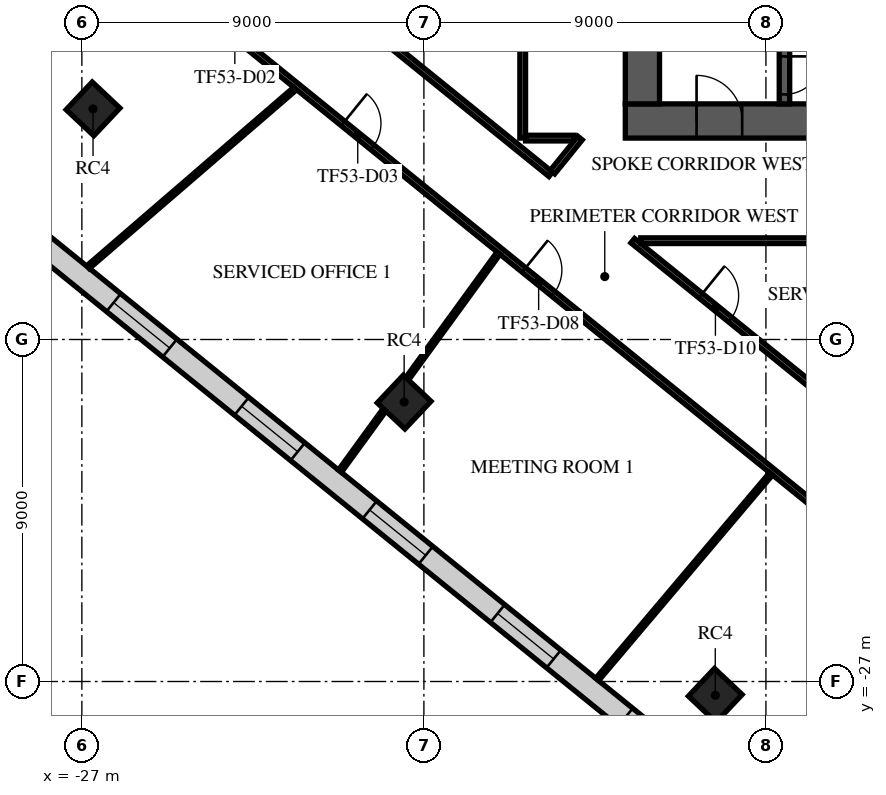
"""IFC4 building model, lengths in metres.
Left out: names, types, materials, properties, quantities, classifications, styles, units other than length and angle.
Written with IfcOpenShell. Run it as: python <this file> out.ifc"""

import sys

from ifc_helpers import new_model, si_unit, direction, frame, frame_2d, origin, origin_2d, place, context, subcontext, project, spatial, rectangle, extrude, element, fill, save


model = new_model("IFC4")
c1 = context("Model", 3, precision=1e-05, world=origin(), true_north=direction((0.0, 1.0)))
c2 = subcontext(c1, "Body", "Model", "MODEL_VIEW")
j1 = project(units=[si_unit("LENGTHUNIT", "METRE"), si_unit("PLANEANGLEUNIT", "RADIAN")], contexts=[c1])
p1 = place(None, origin())
s1 = spatial("IfcSite", under=j1, at=p1, CompositionType="ELEMENT")
p2 = place(p1, origin())
s2 = spatial("IfcBuilding", under=s1, at=p2, CompositionType="ELEMENT")
p3 = place(p2, frame((0.0, 0.0, 225.3)))
s3 = spatial("IfcBuildingStorey", under=s2, at=p3, CompositionType="ELEMENT", Elevation=225.3)
for number, where, z_axis, x_axis in (
    (1, (-26.706, -11.931, 0.0), (0.0, 0.0, 1.0), (0.686, 0.728, 0.0)),
    (2, (-18.52, -19.647, 0.0), (0.0, 0.0, 1.0), (0.686, 0.728, 0.0)),
    (3, (-10.333, -27.364, 0.0), (0.0, 0.0, 1.0), (0.686, 0.728, 0.0)),
):
    element("IfcColumn", number, at=place(p3, frame(where, z_axis=z_axis, x_axis=x_axis)), inside=s3, PredefinedType="COLUMN", context=c2, shape_type="SweptSolid", body=[
        extrude(rectangle(XDim=1.0, YDim=1.0, at=origin_2d()), origin(), (0.0, 0.0, 1.0), 4.0),
    ])
p4 = place(p3, frame((-12.7, -12.25, 0.0), z_axis=(0.0, 0.0, 1.0), x_axis=(1.0, 0.0, 0.0)))
e4 = element("IfcWall", 4, at=p4, inside=s3, PredefinedType="SHEAR", context=c2, shape_type="SweptSolid", body=[
    extrude(rectangle(XDim=25.4, YDim=0.9, at=frame_2d((12.7, 0.0))), origin(), (0.0, 0.0, 1.0), 3.62),
])
p5 = place(p4, frame((7.6, 0.0, 0.0)))
e5 = element("IfcOpeningElement", 5, at=p5, cuts=e4, PredefinedType="OPENING", context=c2, shape_type="SweptSolid", body=[
    extrude(rectangle(XDim=2.0, YDim=2.1, at=frame_2d((1.0, 1.05))), frame((0.0, 0.46, 0.0), z_axis=(0.0, -1.0, 0.0), x_axis=(1.0, 0.0, 0.0)), (0.0, 0.0, 1.0), 0.92),
])
p6 = place(p4, frame((17.725, 0.0, 0.0)))
e6 = element("IfcOpeningElement", 6, at=p6, cuts=e4, PredefinedType="OPENING", context=c2, shape_type="SweptSolid", body=[
    extrude(rectangle(XDim=1.2, YDim=2.1, at=frame_2d((0.6, 1.05))), frame((0.0, 0.46, 0.0), z_axis=(0.0, -1.0, 0.0), x_axis=(1.0, 0.0, 0.0)), (0.0, 0.0, 1.0), 0.92),
])
p7 = place(p4, frame((1.875, 0.0, 0.0)))
e7 = element("IfcOpeningElement", 7, at=p7, cuts=e4, PredefinedType="OPENING", context=c2, shape_type="SweptSolid", body=[
    extrude(rectangle(XDim=1.2, YDim=2.1, at=frame_2d((0.6, 1.05))), frame((0.0, 0.46, 0.0), z_axis=(0.0, -1.0, 0.0), x_axis=(1.0, 0.0, 0.0)), (0.0, 0.0, 1.0), 0.92),
])
p8 = place(p4, frame((22.325, 0.0, 0.0)))
e8 = element("IfcOpeningElement", 8, at=p8, cuts=e4, PredefinedType="OPENING", context=c2, shape_type="SweptSolid", body=[
    extrude(rectangle(XDim=1.2, YDim=2.1, at=frame_2d((0.6, 1.05))), frame((0.0, 0.46, 0.0), z_axis=(0.0, -1.0, 0.0), x_axis=(1.0, 0.0, 0.0)), (0.0, 0.0, 1.0), 0.92),
])
p9 = place(p3, frame((-12.25, -11.8, 0.0), z_axis=(0.0, 0.0, 1.0), x_axis=(0.0, 1.0, 0.0)))
e9 = element("IfcWall", 9, at=p9, inside=s3, PredefinedType="SHEAR", context=c2, shape_type="SweptSolid", body=[
    extrude(rectangle(XDim=23.6, YDim=0.9, at=frame_2d((11.8, 0.0))), origin(), (0.0, 0.0, 1.0), 3.62),
])
p10 = place(p9, frame((10.6, 0.0, 0.0)))
e10 = element("IfcOpeningElement", 10, at=p10, cuts=e9, PredefinedType="OPENING", context=c2, shape_type="SweptSolid", body=[
    extrude(rectangle(XDim=2.4, YDim=2.4, at=frame_2d((1.2, 1.2))), frame((0.0, 0.46, 0.0), z_axis=(0.0, -1.0, 0.0), x_axis=(1.0, 0.0, 0.0)), (0.0, 0.0, 1.0), 0.92),
])
p11 = place(p3, frame((-8.512, -4.55, 0.0), z_axis=(0.0, 0.0, 1.0), x_axis=(0.0, -1.0, 0.0)))
e11 = element("IfcWall", 11, at=p11, inside=s3, PredefinedType="SOLIDWALL", context=c2, shape_type="SweptSolid", body=[
    extrude(rectangle(XDim=7.25, YDim=0.275, at=frame_2d((3.625, 0.0))), origin(), (0.0, 0.0, 1.0), 3.62),
])
p12 = place(p11, frame((6.0, 0.0, 0.0)))
e12 = element("IfcOpeningElement", 12, at=p12, cuts=e11, PredefinedType="OPENING", context=c2, shape_type="SweptSolid", body=[
    extrude(rectangle(XDim=1.0, YDim=2.1, at=frame_2d((0.5, 1.05))), frame((0.0, 0.147, 0.0), z_axis=(0.0, -1.0, 0.0), x_axis=(1.0, 0.0, 0.0)), (0.0, 0.0, 1.0), 0.295),
])
p13 = place(p3, frame((-33.845, -10.81, 0.0), z_axis=(0.0, 0.0, 1.0), x_axis=(0.777145437972, -0.629321037499, 0.0)))
e13 = element("IfcWall", 13, at=p13, inside=s3, PredefinedType="STANDARD", context=c2, shape_type="SweptSolid", body=[
    extrude(rectangle(XDim=39.0, YDim=0.6, at=frame_2d((19.5, 0.0))), origin(), (0.0, 0.0, 1.0), 3.62),
])
p14 = place(p13, frame((1.217, 0.0, 0.9)))
e14 = element("IfcOpeningElement", 14, at=p14, cuts=e13, PredefinedType="OPENING", context=c2, shape_type="SweptSolid", body=[
    extrude(rectangle(XDim=1.9, YDim=2.1, at=frame_2d((0.95, 1.05))), frame((0.0, 0.31, 0.0), z_axis=(0.0, -1.0, 0.0), x_axis=(1.0, 0.0, 0.0)), (0.0, 0.0, 1.0), 0.62),
])
p15 = place(p13, frame((5.55, 0.0, 0.9)))
e15 = element("IfcOpeningElement", 15, at=p15, cuts=e13, PredefinedType="OPENING", context=c2, shape_type="SweptSolid", body=[
    extrude(rectangle(XDim=1.9, YDim=2.1, at=frame_2d((0.95, 1.05))), frame((0.0, 0.31, 0.0), z_axis=(0.0, -1.0, 0.0), x_axis=(1.0, 0.0, 0.0)), (0.0, 0.0, 1.0), 0.62),
])
p16 = place(p13, frame((9.883, 0.0, 0.9)))
e16 = element("IfcOpeningElement", 16, at=p16, cuts=e13, PredefinedType="OPENING", context=c2, shape_type="SweptSolid", body=[
    extrude(rectangle(XDim=1.9, YDim=2.1, at=frame_2d((0.95, 1.05))), frame((0.0, 0.31, 0.0), z_axis=(0.0, -1.0, 0.0), x_axis=(1.0, 0.0, 0.0)), (0.0, 0.0, 1.0), 0.62),
])
p17 = place(p13, frame((14.217, 0.0, 0.9)))
e17 = element("IfcOpeningElement", 17, at=p17, cuts=e13, PredefinedType="OPENING", context=c2, shape_type="SweptSolid", body=[
    extrude(rectangle(XDim=1.9, YDim=2.1, at=frame_2d((0.95, 1.05))), frame((0.0, 0.31, 0.0), z_axis=(0.0, -1.0, 0.0), x_axis=(1.0, 0.0, 0.0)), (0.0, 0.0, 1.0), 0.62),
])
p18 = place(p13, frame((18.55, 0.0, 0.9)))
e18 = element("IfcOpeningElement", 18, at=p18, cuts=e13, PredefinedType="OPENING", context=c2, shape_type="SweptSolid", body=[
    extrude(rectangle(XDim=1.9, YDim=2.1, at=frame_2d((0.95, 1.05))), frame((0.0, 0.31, 0.0), z_axis=(0.0, -1.0, 0.0), x_axis=(1.0, 0.0, 0.0)), (0.0, 0.0, 1.0), 0.62),
])
p19 = place(p13, frame((22.883, 0.0, 0.9)))
e19 = element("IfcOpeningElement", 19, at=p19, cuts=e13, PredefinedType="OPENING", context=c2, shape_type="SweptSolid", body=[
    extrude(rectangle(XDim=1.9, YDim=2.1, at=frame_2d((0.95, 1.05))), frame((0.0, 0.31, 0.0), z_axis=(0.0, -1.0, 0.0), x_axis=(1.0, 0.0, 0.0)), (0.0, 0.0, 1.0), 0.62),
])
p20 = place(p13, frame((27.217, 0.0, 0.9)))
e20 = element("IfcOpeningElement", 20, at=p20, cuts=e13, PredefinedType="OPENING", context=c2, shape_type="SweptSolid", body=[
    extrude(rectangle(XDim=1.9, YDim=2.1, at=frame_2d((0.95, 1.05))), frame((0.0, 0.31, 0.0), z_axis=(0.0, -1.0, 0.0), x_axis=(1.0, 0.0, 0.0)), (0.0, 0.0, 1.0), 0.62),
])
p21 = place(p13, frame((31.55, 0.0, 0.9)))
e21 = element("IfcOpeningElement", 21, at=p21, cuts=e13, PredefinedType="OPENING", context=c2, shape_type="SweptSolid", body=[
    extrude(rectangle(XDim=1.9, YDim=2.1, at=frame_2d((0.95, 1.05))), frame((0.0, 0.31, 0.0), z_axis=(0.0, -1.0, 0.0), x_axis=(1.0, 0.0, 0.0)), (0.0, 0.0, 1.0), 0.62),
])
p22 = place(p13, frame((35.883, 0.0, 0.9)))
e22 = element("IfcOpeningElement", 22, at=p22, cuts=e13, PredefinedType="OPENING", context=c2, shape_type="SweptSolid", body=[
    extrude(rectangle(XDim=1.9, YDim=2.1, at=frame_2d((0.95, 1.05))), frame((0.0, 0.31, 0.0), z_axis=(0.0, -1.0, 0.0), x_axis=(1.0, 0.0, 0.0)), (0.0, 0.0, 1.0), 0.62),
])
p23 = place(p3, frame((-24.374, -8.878, 0.0), z_axis=(0.0, 0.0, 1.0), x_axis=(0.777132572121, -0.629336925143, 0.0)))
e23 = element("IfcWall", 23, at=p23, inside=s3, PredefinedType="PARTITIONING", context=c2, shape_type="SweptSolid", body=[
    extrude(rectangle(XDim=26.785, YDim=0.15, at=frame_2d((13.393, 0.0))), origin(), (0.0, 0.0, 1.0), 3.17),
])
p24 = place(p23, frame((1.3, 0.0, 0.0)))
e24 = element("IfcOpeningElement", 24, at=p24, cuts=e23, PredefinedType="OPENING", context=c2, shape_type="SweptSolid", body=[
    extrude(rectangle(XDim=1.0, YDim=2.1, at=frame_2d((0.5, 1.05))), frame((0.0, 0.085, 0.0), z_axis=(0.0, -1.0, 0.0), x_axis=(1.0, 0.0, 0.0)), (0.0, 0.0, 1.0), 0.17),
])
p25 = place(p23, frame((5.461, 0.0, 0.0)))
e25 = element("IfcOpeningElement", 25, at=p25, cuts=e23, PredefinedType="OPENING", context=c2, shape_type="SweptSolid", body=[
    extrude(rectangle(XDim=1.0, YDim=2.1, at=frame_2d((0.5, 1.05))), frame((0.0, 0.085, 0.0), z_axis=(0.0, -1.0, 0.0), x_axis=(1.0, 0.0, 0.0)), (0.0, 0.0, 1.0), 0.17),
])
p26 = place(p23, frame((11.587, 0.0, 0.0)))
e26 = element("IfcOpeningElement", 26, at=p26, cuts=e23, PredefinedType="OPENING", context=c2, shape_type="SweptSolid", body=[
    extrude(rectangle(XDim=1.0, YDim=2.1, at=frame_2d((0.5, 1.05))), frame((0.0, 0.085, 0.0), z_axis=(0.0, -1.0, 0.0), x_axis=(1.0, 0.0, 0.0)), (0.0, 0.0, 1.0), 0.17),
])
p27 = place(p3, frame((-22.922, -6.965, 0.0), z_axis=(0.0, 0.0, 1.0), x_axis=(0.777148029431, -0.629317837306, 0.0)))
e27 = element("IfcWall", 27, at=p27, inside=s3, PredefinedType="PARTITIONING", context=c2, shape_type="SweptSolid", body=[
    extrude(rectangle(XDim=10.627, YDim=0.15, at=frame_2d((5.314, 0.0))), origin(), (0.0, 0.0, 1.0), 3.17),
])
p28 = place(p3, frame((-15.4, -12.7, 0.0), z_axis=(0.0, 0.0, 1.0), x_axis=(0.0, 1.0, 0.0)))
e28 = element("IfcWall", 28, at=p28, inside=s3, PredefinedType="PARTITIONING", context=c2, shape_type="SweptSolid", body=[
    extrude(rectangle(XDim=20.227, YDim=0.15, at=frame_2d((10.114, 0.0))), origin(), (0.0, 0.0, 1.0), 3.17),
])
p29 = place(p28, frame((10.4, 0.0, 0.0)))
e29 = element("IfcOpeningElement", 29, at=p29, cuts=e28, PredefinedType="OPENING", context=c2, shape_type="SweptSolid", body=[
    extrude(rectangle(XDim=1.0, YDim=2.1, at=frame_2d((0.5, 1.05))), frame((0.0, 0.085, 0.0), z_axis=(0.0, -1.0, 0.0), x_axis=(1.0, 0.0, 0.0)), (0.0, 0.0, 1.0), 0.17),
])
p30 = place(p28, frame((15.784, 0.0, 0.0)))
e30 = element("IfcOpeningElement", 30, at=p30, cuts=e28, PredefinedType="OPENING", context=c2, shape_type="SweptSolid", body=[
    extrude(rectangle(XDim=1.0, YDim=2.1, at=frame_2d((0.5, 1.05))), frame((0.0, 0.085, 0.0), z_axis=(0.0, -1.0, 0.0), x_axis=(1.0, 0.0, 0.0)), (0.0, 0.0, 1.0), 0.17),
])
p31 = place(p3, frame((-15.325, -12.7, 0.0), z_axis=(0.0, 0.0, 1.0), x_axis=(1.0, 0.0, 0.0)))
e31 = element("IfcWall", 31, at=p31, inside=s3, PredefinedType="PARTITIONING", context=c2, shape_type="SweptSolid", body=[
    extrude(rectangle(XDim=1.277, YDim=0.15, at=frame_2d((0.638, 0.0))), origin(), (0.0, 0.0, 1.0), 3.17),
])
p32 = place(p3, frame((-14.616, -13.595, 0.0), z_axis=(0.0, 0.0, 1.0), x_axis=(0.629338514223, 0.777131285251, 0.0)))
e32 = element("IfcWall", 32, at=p32, inside=s3, PredefinedType="PARTITIONING", context=c2, shape_type="SweptSolid", body=[
    extrude(rectangle(XDim=1.151, YDim=0.15, at=frame_2d((0.576, 0.0))), origin(), (0.0, 0.0, 1.0), 3.17),
])
p33 = place(p3, frame((-12.505, -15.4, 0.0), z_axis=(0.0, 0.0, 1.0), x_axis=(0.77712909422, -0.629341219783, 0.0)))
e33 = element("IfcWall", 33, at=p33, inside=s3, PredefinedType="PARTITIONING", context=c2, shape_type="SweptSolid", body=[
    extrude(rectangle(XDim=13.457, YDim=0.15, at=frame_2d((6.729, 0.0))), origin(), (0.0, 0.0, 1.0), 3.17),
])
p34 = place(p33, frame((2.3, 0.0, 0.0)))
e34 = element("IfcOpeningElement", 34, at=p34, cuts=e33, PredefinedType="OPENING", context=c2, shape_type="SweptSolid", body=[
    extrude(rectangle(XDim=1.0, YDim=2.1, at=frame_2d((0.5, 1.05))), frame((0.0, 0.085, 0.0), z_axis=(0.0, -1.0, 0.0), x_axis=(1.0, 0.0, 0.0)), (0.0, 0.0, 1.0), 0.17),
])
p35 = place(p3, frame((-12.293, -15.4, 0.0), z_axis=(0.0, 0.0, 1.0), x_axis=(1.0, 0.0, 0.0)))
e35 = element("IfcWall", 35, at=p35, inside=s3, PredefinedType="PARTITIONING", context=c2, shape_type="SweptSolid", body=[
    extrude(rectangle(XDim=21.489, YDim=0.15, at=frame_2d((10.745, 0.0))), origin(), (0.0, 0.0, 1.0), 3.17),
])
p36 = place(p35, frame((13.212, 0.0, 0.0)))
e36 = element("IfcOpeningElement", 36, at=p36, cuts=e35, PredefinedType="OPENING", context=c2, shape_type="SweptSolid", body=[
    extrude(rectangle(XDim=1.8, YDim=2.1, at=frame_2d((0.9, 1.05))), frame((0.0, 0.085, 0.0), z_axis=(0.0, -1.0, 0.0), x_axis=(1.0, 0.0, 0.0)), (0.0, 0.0, 1.0), 0.17),
])
p37 = place(p3, frame((-26.837, -16.096, 0.0), z_axis=(0.0, 0.0, 1.0), x_axis=(0.757242011922, 0.653134393046, 0.0)))
e37 = element("IfcWall", 37, at=p37, inside=s3, PredefinedType="PARTITIONING", context=c2, shape_type="SweptSolid", body=[
    extrude(rectangle(XDim=7.19, YDim=0.1, at=frame_2d((3.595, 0.0))), origin(), (0.0, 0.0, 1.0), 2.97),
])
p38 = place(p3, frame((-20.208, -21.464, 0.0), z_axis=(0.0, 0.0, 1.0), x_axis=(0.588273501318, 0.808662035492, 0.0)))
e38 = element("IfcWall", 38, at=p38, inside=s3, PredefinedType="PARTITIONING", context=c2, shape_type="SweptSolid", body=[
    extrude(rectangle(XDim=1.996, YDim=0.1, at=frame_2d((0.998, 0.0))), origin(), (0.0, 0.0, 1.0), 3.62),
])
p39 = place(p3, frame((-18.441, -19.034, 0.0), z_axis=(0.0, 0.0, 1.0), x_axis=(0.588267582256, 0.808666341371, 0.0)))
e39 = element("IfcWall", 39, at=p39, inside=s3, PredefinedType="PARTITIONING", context=c2, shape_type="SweptSolid", body=[
    extrude(rectangle(XDim=4.087, YDim=0.1, at=frame_2d((2.044, 0.0))), origin(), (0.0, 0.0, 1.0), 3.05),
])
p40 = place(p3, frame((-13.439, -26.945, 0.0), z_axis=(0.0, 0.0, 1.0), x_axis=(0.645645597662, 0.763637192795, 0.0)))
e40 = element("IfcWall", 40, at=p40, inside=s3, PredefinedType="PARTITIONING", context=c2, shape_type="SweptSolid", body=[
    extrude(rectangle(XDim=7.085, YDim=0.1, at=frame_2d((3.542, 0.0))), origin(), (0.0, 0.0, 1.0), 2.97),
])
p41 = place(p7, origin())
e41 = element("IfcDoor", 41, at=p41, inside=s3, OperationType="SINGLE_SWING_LEFT", PredefinedType="DOOR", context=c2, shape_type="SweptSolid", body=[
    extrude(rectangle(XDim=1.2, YDim=2.1, at=frame_2d((0.6, 1.05))), frame((0.0, 0.025, 0.0), z_axis=(0.0, -1.0, 0.0), x_axis=(1.0, 0.0, 0.0)), (0.0, 0.0, 1.0), 0.05),
])
fill(e7, e41)
p42 = place(p12, origin())
e42 = element("IfcDoor", 42, at=p42, inside=s3, OperationType="SINGLE_SWING_LEFT", PredefinedType="DOOR", context=c2, shape_type="SweptSolid", body=[
    extrude(rectangle(XDim=1.0, YDim=2.1, at=frame_2d((0.5, 1.05))), frame((0.0, 0.025, 0.0), z_axis=(0.0, -1.0, 0.0), x_axis=(1.0, 0.0, 0.0)), (0.0, 0.0, 1.0), 0.05),
])
fill(e12, e42)
p43 = place(p16, origin())
e43 = element("IfcWindow", 43, at=p43, inside=s3, PartitioningType="SINGLE_PANEL", PredefinedType="WINDOW", context=c2, shape_type="SweptSolid", body=[
    extrude(rectangle(XDim=1.9, YDim=2.1, at=frame_2d((0.95, 1.05))), frame((0.0, 0.03, 0.0), z_axis=(0.0, -1.0, 0.0), x_axis=(1.0, 0.0, 0.0)), (0.0, 0.0, 1.0), 0.06),
])
fill(e16, e43)
p44 = place(p17, origin())
e44 = element("IfcWindow", 44, at=p44, inside=s3, PartitioningType="SINGLE_PANEL", PredefinedType="WINDOW", context=c2, shape_type="SweptSolid", body=[
    extrude(rectangle(XDim=1.9, YDim=2.1, at=frame_2d((0.95, 1.05))), frame((0.0, 0.03, 0.0), z_axis=(0.0, -1.0, 0.0), x_axis=(1.0, 0.0, 0.0)), (0.0, 0.0, 1.0), 0.06),
])
fill(e17, e44)
p45 = place(p18, origin())
e45 = element("IfcWindow", 45, at=p45, inside=s3, PartitioningType="SINGLE_PANEL", PredefinedType="WINDOW", context=c2, shape_type="SweptSolid", body=[
    extrude(rectangle(XDim=1.9, YDim=2.1, at=frame_2d((0.95, 1.05))), frame((0.0, 0.03, 0.0), z_axis=(0.0, -1.0, 0.0), x_axis=(1.0, 0.0, 0.0)), (0.0, 0.0, 1.0), 0.06),
])
fill(e18, e45)
p46 = place(p19, origin())
e46 = element("IfcWindow", 46, at=p46, inside=s3, PartitioningType="SINGLE_PANEL", PredefinedType="WINDOW", context=c2, shape_type="SweptSolid", body=[
    extrude(rectangle(XDim=1.9, YDim=2.1, at=frame_2d((0.95, 1.05))), frame((0.0, 0.03, 0.0), z_axis=(0.0, -1.0, 0.0), x_axis=(1.0, 0.0, 0.0)), (0.0, 0.0, 1.0), 0.06),
])
fill(e19, e46)
p47 = place(p25, frame((1.0, 0.0, 0.0), z_axis=(0.0, 0.0, 1.0), x_axis=(-1.0, 0.0, 0.0)))
e47 = element("IfcDoor", 47, at=p47, inside=s3, OperationType="SINGLE_SWING_LEFT", PredefinedType="DOOR", context=c2, shape_type="SweptSolid", body=[
    extrude(rectangle(XDim=1.0, YDim=2.1, at=frame_2d((0.5, 1.05))), frame((0.0, 0.025, 0.0), z_axis=(0.0, -1.0, 0.0), x_axis=(1.0, 0.0, 0.0)), (0.0, 0.0, 1.0), 0.05),
])
fill(e25, e47)
p48 = place(p26, frame((1.0, 0.0, 0.0), z_axis=(0.0, 0.0, 1.0), x_axis=(-1.0, 0.0, 0.0)))
e48 = element("IfcDoor", 48, at=p48, inside=s3, OperationType="SINGLE_SWING_RIGHT", PredefinedType="DOOR", context=c2, shape_type="SweptSolid", body=[
    extrude(rectangle(XDim=1.0, YDim=2.1, at=frame_2d((0.5, 1.05))), frame((0.0, 0.025, 0.0), z_axis=(0.0, -1.0, 0.0), x_axis=(1.0, 0.0, 0.0)), (0.0, 0.0, 1.0), 0.05),
])
fill(e26, e48)
p49 = place(p34, origin())
e49 = element("IfcDoor", 49, at=p49, inside=s3, OperationType="SINGLE_SWING_RIGHT", PredefinedType="DOOR", context=c2, shape_type="SweptSolid", body=[
    extrude(rectangle(XDim=1.0, YDim=2.1, at=frame_2d((0.5, 1.05))), frame((0.0, 0.025, 0.0), z_axis=(0.0, -1.0, 0.0), x_axis=(1.0, 0.0, 0.0)), (0.0, 0.0, 1.0), 0.05),
])
fill(e34, e49)
save(model, sys.argv[1])
